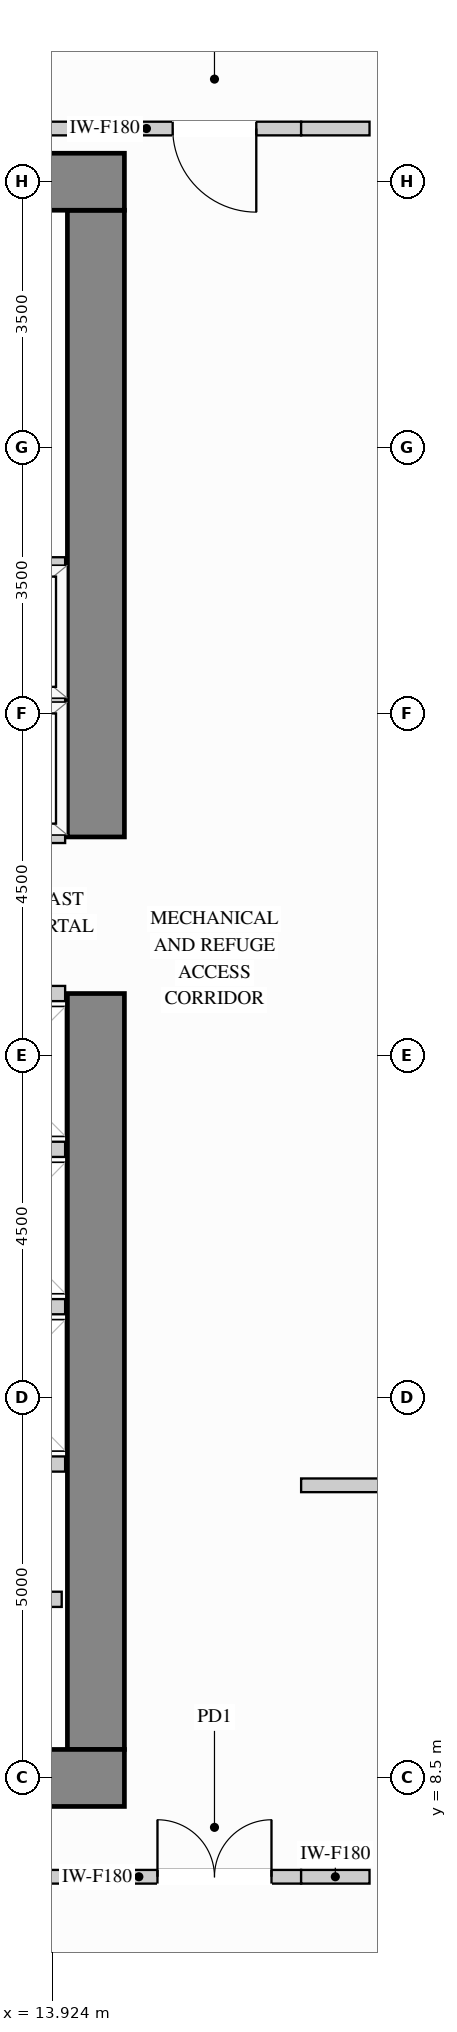
"""IFC4 building model, lengths in metres.
Left out: names, types, materials, properties, quantities, classifications, styles, units other than length and angle.
Written with IfcOpenShell. Run it as: python <this file> out.ifc"""

import sys

from ifc_helpers import new_model, si_unit, direction, frame, frame_2d, origin, place, context, subcontext, project, spatial, rectangle, extrude, source, transform, mapped, element, fill, save


model = new_model("IFC4")
c1 = context("Model", 3, precision=1e-05, world=origin(), true_north=direction((0.0, 1.0)))
c2 = subcontext(c1, "Body", "Model", "MODEL_VIEW")
j1 = project(units=[si_unit("LENGTHUNIT", "METRE"), si_unit("PLANEANGLEUNIT", "RADIAN")], contexts=[c1])
p1 = place(None, origin())
s1 = spatial("IfcSite", under=j1, at=p1, CompositionType="ELEMENT")
p2 = place(p1, origin())
s2 = spatial("IfcBuilding", under=s1, at=p2, CompositionType="ELEMENT")
p3 = place(p2, frame((0.0, 0.0, 138.6)))
s3 = spatial("IfcBuildingStorey", under=s2, at=p3, CompositionType="ELEMENT", Elevation=138.6)
m1 = source(origin(), c2, "Body", "SweptSolid", [
    extrude(rectangle(XDim=9.945, YDim=0.75, at=frame_2d((4.973, 0.0))), origin(), (0.0, 0.0, 1.0), 4.26),
])
p4 = place(p3, frame((14.5, 8.875, 0.0), z_axis=(0.0, 0.0, 1.0), x_axis=(0.0, 1.0, 0.0)))
e1 = element("IfcWall", 1, at=p4, inside=s3, PredefinedType="SHEAR", context=c2, shape_type="MappedRepresentation", body=[
    mapped(m1, transform((0.0, 0.0, 0.0), x_axis=(1.0, 0.0, 0.0), y_axis=(0.0, 1.0, 0.0), z_axis=(0.0, 0.0, 1.0))),
])
m2 = source(origin(), c2, "Body", "SweptSolid", [
    extrude(rectangle(XDim=8.245, YDim=0.75, at=frame_2d((4.123, 0.0))), origin(), (0.0, 0.0, 1.0), 4.26),
])
p5 = place(p3, frame((14.5, 20.88, 0.0), z_axis=(0.0, 0.0, 1.0), x_axis=(0.0, 1.0, 0.0)))
e2 = element("IfcWall", 2, at=p5, inside=s3, PredefinedType="SHEAR", context=c2, shape_type="MappedRepresentation", body=[
    mapped(m2, transform((0.0, 0.0, 0.0), x_axis=(1.0, 0.0, 0.0), y_axis=(0.0, 1.0, 0.0), z_axis=(0.0, 0.0, 1.0))),
])
m3 = source(origin(), c2, "Body", "SweptSolid", [
    extrude(rectangle(XDim=10.75, YDim=0.75, at=frame_2d((5.375, 0.0))), origin(), (0.0, 0.0, 1.0), 4.26),
])
for number, where, z_axis, x_axis in (
    (3, (4.125, 29.5, 0.0), (0.0, 0.0, 1.0), (1.0, 0.0, 0.0)),
    (4, (4.125, 8.5, 0.0), (0.0, 0.0, 1.0), (1.0, 0.0, 0.0)),
):
    element("IfcWall", number, at=place(p3, frame(where, z_axis=z_axis, x_axis=x_axis)), inside=s3, PredefinedType="SHEAR", context=c2, shape_type="MappedRepresentation", body=[
        mapped(m3, transform((0.0, 0.0, 0.0), x_axis=(1.0, 0.0, 0.0), y_axis=(0.0, 1.0, 0.0), z_axis=(0.0, 0.0, 1.0))),
    ])
p6 = place(p3, frame((14.92, 7.2, 0.0), z_axis=(0.0, 0.0, 1.0), x_axis=(1.0, 0.0, 0.0)))
e5 = element("IfcWall", 5, at=p6, inside=s3, PredefinedType="PARTITIONING", context=c2, shape_type="SweptSolid", body=[
    extrude(rectangle(XDim=2.28, YDim=0.18, at=frame_2d((1.14, 0.0))), origin(), (0.0, 0.0, 1.0), 4.245),
])
p7 = place(p6, frame((0.39, 0.0, 0.0)))
e6 = element("IfcOpeningElement", 6, at=p7, cuts=e5, PredefinedType="OPENING", context=c2, shape_type="SweptSolid", body=[
    extrude(rectangle(XDim=1.5, YDim=2.2, at=frame_2d((0.75, 1.1))), frame((0.0, 0.1, 0.0), z_axis=(0.0, -1.0, 0.0), x_axis=(1.0, 0.0, 0.0)), (0.0, 0.0, 1.0), 0.2),
])
m4 = source(origin(), c2, "Body", "SweptSolid", [
    extrude(rectangle(XDim=13.42, YDim=0.18, at=frame_2d((6.71, 0.0))), origin(), (0.0, 0.0, 1.0), 4.245),
])
p8 = place(p3, frame((1.5, 7.2, 0.0), z_axis=(0.0, 0.0, 1.0), x_axis=(1.0, 0.0, 0.0)))
e7 = element("IfcWall", 7, at=p8, inside=s3, PredefinedType="PARTITIONING", context=c2, shape_type="MappedRepresentation", body=[
    mapped(m4, transform((0.0, 0.0, 0.0), x_axis=(1.0, 0.0, 0.0), y_axis=(0.0, 1.0, 0.0), z_axis=(0.0, 0.0, 1.0))),
])
m5 = source(origin(), c2, "Body", "SweptSolid", [
    extrude(rectangle(XDim=0.9, YDim=0.18, at=frame_2d((0.45, 0.0))), origin(), (0.0, 0.0, 1.0), 4.245),
])
p9 = place(p3, frame((17.2, 7.2, 0.0), z_axis=(0.0, 0.0, 1.0), x_axis=(1.0, 0.0, 0.0)))
e8 = element("IfcWall", 8, at=p9, inside=s3, PredefinedType="PARTITIONING", context=c2, shape_type="MappedRepresentation", body=[
    mapped(m5, transform((0.0, 0.0, 0.0), x_axis=(1.0, 0.0, 0.0), y_axis=(0.0, 1.0, 0.0), z_axis=(0.0, 0.0, 1.0))),
])
p10 = place(p3, frame((14.92, 30.2, 0.0), z_axis=(0.0, 0.0, 1.0), x_axis=(1.0, 0.0, 0.0)))
e9 = element("IfcWall", 9, at=p10, inside=s3, PredefinedType="PARTITIONING", context=c2, shape_type="SweptSolid", body=[
    extrude(rectangle(XDim=2.28, YDim=0.18, at=frame_2d((1.14, 0.0))), origin(), (0.0, 0.0, 1.0), 4.245),
])
p11 = place(p10, frame((0.59, 0.0, 0.0)))
e10 = element("IfcOpeningElement", 10, at=p11, cuts=e9, PredefinedType="OPENING", context=c2, shape_type="SweptSolid", body=[
    extrude(rectangle(XDim=1.1, YDim=2.15, at=frame_2d((0.55, 1.075))), frame((0.0, 0.1, 0.0), z_axis=(0.0, -1.0, 0.0), x_axis=(1.0, 0.0, 0.0)), (0.0, 0.0, 1.0), 0.2),
])
p12 = place(p3, frame((1.5, 30.2, 0.0), z_axis=(0.0, 0.0, 1.0), x_axis=(1.0, 0.0, 0.0)))
e11 = element("IfcWall", 11, at=p12, inside=s3, PredefinedType="PARTITIONING", context=c2, shape_type="MappedRepresentation", body=[
    mapped(m4, transform((0.0, 0.0, 0.0), x_axis=(1.0, 0.0, 0.0), y_axis=(0.0, 1.0, 0.0), z_axis=(0.0, 0.0, 1.0))),
])
p13 = place(p3, frame((17.2, 30.2, 0.0), z_axis=(0.0, 0.0, 1.0), x_axis=(1.0, 0.0, 0.0)))
e12 = element("IfcWall", 12, at=p13, inside=s3, PredefinedType="PARTITIONING", context=c2, shape_type="MappedRepresentation", body=[
    mapped(m5, transform((0.0, 0.0, 0.0), x_axis=(1.0, 0.0, 0.0), y_axis=(0.0, 1.0, 0.0), z_axis=(0.0, 0.0, 1.0))),
])
m6 = source(origin(), c2, "Body", "SweptSolid", [
    extrude(rectangle(XDim=6.85, YDim=0.18, at=frame_2d((3.425, 0.0))), origin(), (0.0, 0.0, 1.0), 4.245),
])
p14 = place(p3, frame((17.2, 12.35, 0.0), z_axis=(0.0, 0.0, 1.0), x_axis=(1.0, 0.0, 0.0)))
e13 = element("IfcWall", 13, at=p14, inside=s3, PredefinedType="PARTITIONING", context=c2, shape_type="MappedRepresentation", body=[
    mapped(m6, transform((0.0, 0.0, 0.0), x_axis=(1.0, 0.0, 0.0), y_axis=(0.0, 1.0, 0.0), z_axis=(0.0, 0.0, 1.0))),
])
m7 = source(origin(), c2, "Body", "SweptSolid", [
    extrude(rectangle(XDim=1.63, YDim=0.2, at=frame_2d((0.815, 0.0))), origin(), (0.0, 0.0, 1.0), 4.245),
])
p15 = place(p3, frame((12.42, 10.85, 0.0), z_axis=(0.0, 0.0, 1.0), x_axis=(1.0, 0.0, 0.0)))
e14 = element("IfcWall", 14, at=p15, inside=s3, PredefinedType="PARTITIONING", context=c2, shape_type="MappedRepresentation", body=[
    mapped(m7, transform((0.0, 0.0, 0.0), x_axis=(1.0, 0.0, 0.0), y_axis=(0.0, 1.0, 0.0), z_axis=(0.0, 0.0, 1.0))),
])
m8 = source(origin(), c2, "Body", "SweptSolid", [
    extrude(rectangle(XDim=2.265, YDim=0.2, at=frame_2d((1.132, 0.0))), origin(), (0.0, 0.0, 1.0), 4.245),
])
for number, where, z_axis, x_axis in (
    (15, (11.83, 22.66, 0.0), (0.0, 0.0, 1.0), (1.0, 0.0, 0.0)),
    (16, (11.83, 20.9, 0.0), (0.0, 0.0, 1.0), (1.0, 0.0, 0.0)),
    (17, (11.83, 24.46, 0.0), (0.0, 0.0, 1.0), (1.0, 0.0, 0.0)),
):
    element("IfcWall", number, at=place(p3, frame(where, z_axis=z_axis, x_axis=x_axis)), inside=s3, PredefinedType="PARTITIONING", context=c2, shape_type="MappedRepresentation", body=[
        mapped(m8, transform((0.0, 0.0, 0.0), x_axis=(1.0, 0.0, 0.0), y_axis=(0.0, 1.0, 0.0), z_axis=(0.0, 0.0, 1.0))),
    ])
m9 = source(origin(), c2, "Body", "SweptSolid", [
    extrude(rectangle(XDim=1.865, YDim=0.2, at=frame_2d((0.933, 0.0))), origin(), (0.0, 0.0, 1.0), 4.245),
])
for number, where, z_axis, x_axis in (
    (18, (12.23, 14.7, 0.0), (0.0, 0.0, 1.0), (1.0, 0.0, 0.0)),
    (19, (12.23, 12.63, 0.0), (0.0, 0.0, 1.0), (1.0, 0.0, 0.0)),
    (20, (12.23, 16.77, 0.0), (0.0, 0.0, 1.0), (1.0, 0.0, 0.0)),
    (21, (12.23, 18.82, 0.0), (0.0, 0.0, 1.0), (1.0, 0.0, 0.0)),
):
    element("IfcWall", number, at=place(p3, frame(where, z_axis=z_axis, x_axis=x_axis)), inside=s3, PredefinedType="PARTITIONING", context=c2, shape_type="MappedRepresentation", body=[
        mapped(m9, transform((0.0, 0.0, 0.0), x_axis=(1.0, 0.0, 0.0), y_axis=(0.0, 1.0, 0.0), z_axis=(0.0, 0.0, 1.0))),
    ])
m10 = source(origin(), c2, "Body", "SweptSolid", [
    extrude(rectangle(XDim=1.1, YDim=2.15, at=frame_2d((0.55, 1.075))), frame((0.0, 0.025, 0.0), z_axis=(0.0, -1.0, 0.0), x_axis=(1.0, 0.0, 0.0)), (0.0, 0.0, 1.0), 0.05),
])
p16 = place(p11, origin())
e22 = element("IfcDoor", 22, at=p16, inside=s3, OperationType="SINGLE_SWING_RIGHT", PredefinedType="DOOR", context=c2, shape_type="MappedRepresentation", body=[
    mapped(m10, transform((0.0, 0.0, 0.0), x_axis=(1.0, 0.0, 0.0), y_axis=(0.0, 1.0, 0.0), z_axis=(0.0, 0.0, 1.0))),
])
fill(e10, e22)
m11 = source(origin(), c2, "Body", "SweptSolid", [
    extrude(rectangle(XDim=1.5, YDim=2.2, at=frame_2d((0.75, 1.1))), frame((0.0, 0.025, 0.0), z_axis=(0.0, -1.0, 0.0), x_axis=(1.0, 0.0, 0.0)), (0.0, 0.0, 1.0), 0.05),
])
p17 = place(p7, origin())
e23 = element("IfcDoor", 23, at=p17, inside=s3, OperationType="DOUBLE_DOOR_SINGLE_SWING", PredefinedType="DOOR", context=c2, shape_type="MappedRepresentation", body=[
    mapped(m11, transform((0.0, 0.0, 0.0), x_axis=(1.0, 0.0, 0.0), y_axis=(0.0, 1.0, 0.0), z_axis=(0.0, 0.0, 1.0))),
])
fill(e6, e23)
save(model, sys.argv[1])
